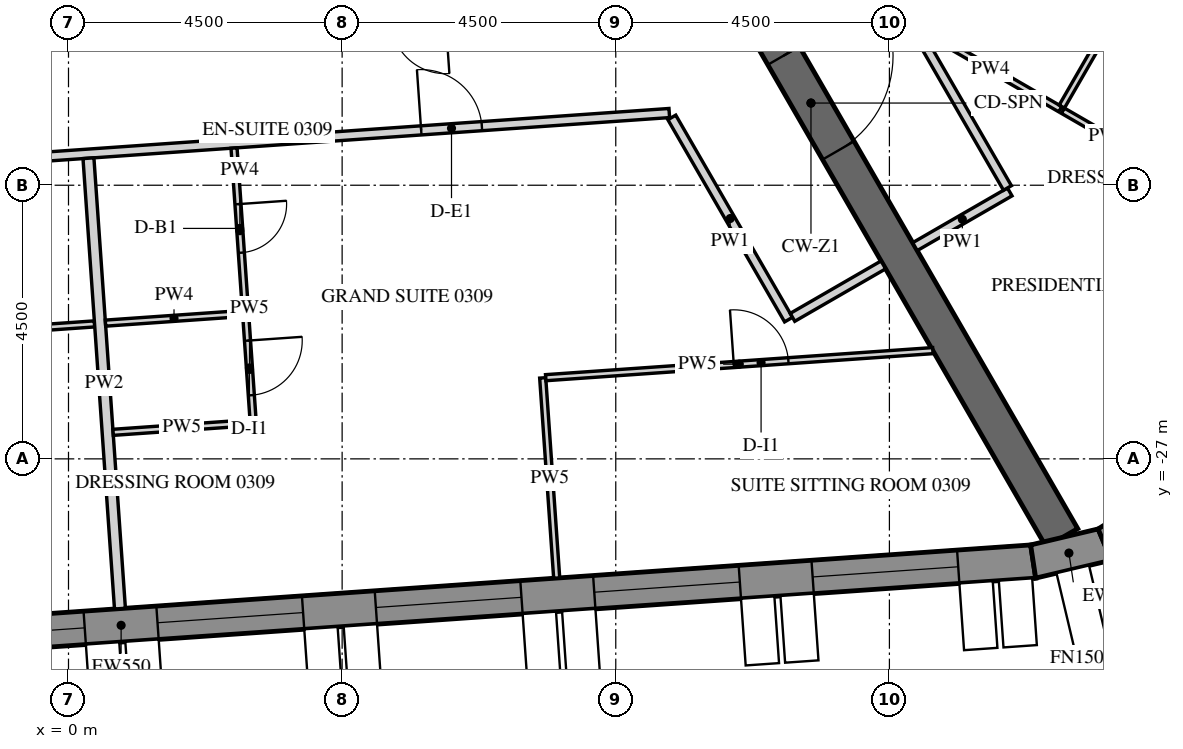
"""IFC4 building model, lengths in metres.
Left out: names, types, materials, properties, quantities, classifications, styles, units other than length and angle.
Written with IfcOpenShell. Run it as: python <this file> out.ifc"""

import sys

from ifc_helpers import new_model, si_unit, direction, frame, frame_2d, origin, place, context, subcontext, project, spatial, polyline, rectangle, outline, extrude, element, fill, save


model = new_model("IFC4")
c1 = context("Model", 3, precision=1e-05, world=origin(), true_north=direction((0.0, 1.0)))
c2 = subcontext(c1, "Body", "Model", "MODEL_VIEW")
j1 = project(units=[si_unit("LENGTHUNIT", "METRE"), si_unit("PLANEANGLEUNIT", "RADIAN")], contexts=[c1])
p1 = place(None, origin())
s1 = spatial("IfcSite", under=j1, at=p1, CompositionType="ELEMENT")
p2 = place(p1, origin())
s2 = spatial("IfcBuilding", under=s1, at=p2, CompositionType="ELEMENT")
p3 = place(p2, frame((0.0, 0.0, 60.9)))
s3 = spatial("IfcBuildingStorey", under=s2, at=p3, CompositionType="ELEMENT", Elevation=60.9)
p4 = place(p3, frame((-14.134, -30.786, -0.15), z_axis=(0.0, 0.0, 1.0), x_axis=(0.997564037441, 0.069756657061, 0.0)))
e1 = element("IfcWall", 1, at=p4, inside=s3, PredefinedType="SOLIDWALL", context=c2, shape_type="SweptSolid", body=[
    extrude(outline(polyline([(-0.026, -0.275), (30.094, -0.275), (30.049, 0.275), (0.026, 0.275), (-0.026, -0.275)])), origin(), (0.0, 0.0, 1.0), 3.9),
])
p5 = place(p4, frame((1.236, 0.0, 1.05)))
e2 = element("IfcOpeningElement", 2, at=p5, cuts=e1, PredefinedType="OPENING", context=c2, shape_type="SweptSolid", body=[
    extrude(rectangle(XDim=2.4, YDim=2.4, at=frame_2d((1.2, 1.2))), frame((0.0, 0.285, 0.0), z_axis=(0.0, -1.0, 0.0), x_axis=(1.0, 0.0, 0.0)), (0.0, 0.0, 1.0), 0.57),
])
p6 = place(p4, frame((4.835, 0.0, 1.05)))
e3 = element("IfcOpeningElement", 3, at=p6, cuts=e1, PredefinedType="OPENING", context=c2, shape_type="SweptSolid", body=[
    extrude(rectangle(XDim=2.4, YDim=2.4, at=frame_2d((1.2, 1.2))), frame((0.0, 0.285, 0.0), z_axis=(0.0, -1.0, 0.0), x_axis=(1.0, 0.0, 0.0)), (0.0, 0.0, 1.0), 0.57),
])
p7 = place(p4, frame((8.436, 0.0, 1.05)))
e4 = element("IfcOpeningElement", 4, at=p7, cuts=e1, PredefinedType="OPENING", context=c2, shape_type="SweptSolid", body=[
    extrude(rectangle(XDim=2.4, YDim=2.4, at=frame_2d((1.2, 1.2))), frame((0.0, 0.285, 0.0), z_axis=(0.0, -1.0, 0.0), x_axis=(1.0, 0.0, 0.0)), (0.0, 0.0, 1.0), 0.57),
])
p8 = place(p4, frame((12.035, 0.0, 1.05)))
e5 = element("IfcOpeningElement", 5, at=p8, cuts=e1, PredefinedType="OPENING", context=c2, shape_type="SweptSolid", body=[
    extrude(rectangle(XDim=2.4, YDim=2.4, at=frame_2d((1.2, 1.2))), frame((0.0, 0.285, 0.0), z_axis=(0.0, -1.0, 0.0), x_axis=(1.0, 0.0, 0.0)), (0.0, 0.0, 1.0), 0.57),
])
p9 = place(p4, frame((15.635, 0.0, 1.05)))
e6 = element("IfcOpeningElement", 6, at=p9, cuts=e1, PredefinedType="OPENING", context=c2, shape_type="SweptSolid", body=[
    extrude(rectangle(XDim=2.4, YDim=2.4, at=frame_2d((1.2, 1.2))), frame((0.0, 0.285, 0.0), z_axis=(0.0, -1.0, 0.0), x_axis=(1.0, 0.0, 0.0)), (0.0, 0.0, 1.0), 0.57),
])
p10 = place(p4, frame((19.236, 0.0, 1.05)))
e7 = element("IfcOpeningElement", 7, at=p10, cuts=e1, PredefinedType="OPENING", context=c2, shape_type="SweptSolid", body=[
    extrude(rectangle(XDim=2.4, YDim=2.4, at=frame_2d((1.2, 1.2))), frame((0.0, 0.285, 0.0), z_axis=(0.0, -1.0, 0.0), x_axis=(1.0, 0.0, 0.0)), (0.0, 0.0, 1.0), 0.57),
])
p11 = place(p4, frame((22.835, 0.0, 1.05)))
e8 = element("IfcOpeningElement", 8, at=p11, cuts=e1, PredefinedType="OPENING", context=c2, shape_type="SweptSolid", body=[
    extrude(rectangle(XDim=2.4, YDim=2.4, at=frame_2d((1.2, 1.2))), frame((0.0, 0.285, 0.0), z_axis=(0.0, -1.0, 0.0), x_axis=(1.0, 0.0, 0.0)), (0.0, 0.0, 1.0), 0.57),
])
p12 = place(p4, frame((26.436, 0.0, 1.05)))
e9 = element("IfcOpeningElement", 9, at=p12, cuts=e1, PredefinedType="OPENING", context=c2, shape_type="SweptSolid", body=[
    extrude(rectangle(XDim=2.4, YDim=2.4, at=frame_2d((1.2, 1.2))), frame((0.0, 0.285, 0.0), z_axis=(0.0, -1.0, 0.0), x_axis=(1.0, 0.0, 0.0)), (0.0, 0.0, 1.0), 0.57),
])
p13 = place(p3, frame((15.864, -28.688, -0.15), z_axis=(0.0, 0.0, 1.0), x_axis=(0.973063591128, 0.230536868247, 0.0)))
e10 = element("IfcWall", 10, at=p13, inside=s3, PredefinedType="SOLIDWALL", context=c2, shape_type="SweptSolid", body=[
    extrude(outline(polyline([(-0.022, -0.275), (1.253, -0.275), (1.163, 0.275), (0.022, 0.275), (-0.022, -0.275)])), origin(), (0.0, 0.0, 1.0), 3.9),
])
p14 = place(p3, frame((17.04, -28.41, -0.15), z_axis=(0.0, 0.0, 1.0), x_axis=(0.847952888306, 0.530071598195, 0.0)))
e11 = element("IfcWall", 11, at=p14, inside=s3, PredefinedType="SOLIDWALL", context=c2, shape_type="SweptSolid", body=[
    extrude(outline(polyline([(-0.045, -0.275), (1.253, -0.275), (1.163, 0.275), (0.045, 0.275), (-0.045, -0.275)])), origin(), (0.0, 0.0, 1.0), 3.9),
])
p15 = place(p3, frame((8.083, -14.0, -0.15), z_axis=(0.0, 0.0, 1.0), x_axis=(0.499997680643, -0.866026742862, 0.0)))
e12 = element("IfcWall", 12, at=p15, inside=s3, PredefinedType="SHEAR", context=c2, shape_type="SweptSolid", body=[
    extrude(rectangle(XDim=16.509, YDim=0.6, at=frame_2d((8.254, 0.0))), origin(), (0.0, 0.0, 1.0), 3.9),
])
p16 = place(p15, frame((7.354, 0.0, 0.15)))
e13 = element("IfcOpeningElement", 13, at=p16, cuts=e12, PredefinedType="OPENING", context=c2, shape_type="SweptSolid", body=[
    extrude(rectangle(XDim=1.8, YDim=2.4, at=frame_2d((0.9, 1.2))), frame((0.0, 0.31, 0.0), z_axis=(0.0, -1.0, 0.0), x_axis=(1.0, 0.0, 0.0)), (0.0, 0.0, 1.0), 0.62),
])
p17 = place(p3, frame((-12.068, -22.847, 0.0), z_axis=(0.0, 0.0, 1.0), x_axis=(0.99756437486, 0.069751831595, 0.0)))
e14 = element("IfcWall", 14, at=p17, inside=s3, PredefinedType="PARTITIONING", context=c2, shape_type="SweptSolid", body=[
    extrude(rectangle(XDim=22.002, YDim=0.15, at=frame_2d((11.001, 0.0))), origin(), (0.0, 0.0, 1.0), 2.988),
])
p18 = place(p17, frame((4.469, 0.0, 0.0)))
e15 = element("IfcOpeningElement", 15, at=p18, cuts=e14, PredefinedType="OPENING", context=c2, shape_type="SweptSolid", body=[
    extrude(rectangle(XDim=1.0, YDim=2.1, at=frame_2d((0.5, 1.05))), frame((0.0, 0.085, 0.0), z_axis=(0.0, -1.0, 0.0), x_axis=(1.0, 0.0, 0.0)), (0.0, 0.0, 1.0), 0.17),
])
p19 = place(p17, frame((17.912, 0.0, 0.0)))
e16 = element("IfcOpeningElement", 16, at=p19, cuts=e14, PredefinedType="OPENING", context=c2, shape_type="SweptSolid", body=[
    extrude(rectangle(XDim=1.0, YDim=2.1, at=frame_2d((0.5, 1.05))), frame((0.0, 0.085, 0.0), z_axis=(0.0, -1.0, 0.0), x_axis=(1.0, 0.0, 0.0)), (0.0, 0.0, 1.0), 0.17),
])
p20 = place(p3, frame((9.922, -21.385, 0.0), z_axis=(0.0, 0.0, 1.0), x_axis=(0.500023335103, -0.866011930837, 0.0)))
e17 = element("IfcWall", 17, at=p20, inside=s3, PredefinedType="PARTITIONING", context=c2, shape_type="SweptSolid", body=[
    extrude(rectangle(XDim=3.84, YDim=0.15, at=frame_2d((1.92, 0.0))), origin(), (0.0, 0.0, 1.0), 2.988),
])
p21 = place(p3, frame((11.906, -24.673, 0.0), z_axis=(0.0, 0.0, 1.0), x_axis=(0.866013532718, 0.500020560727, 0.0)))
e18 = element("IfcWall", 18, at=p21, inside=s3, PredefinedType="PARTITIONING", context=c2, shape_type="SweptSolid", body=[
    extrude(rectangle(XDim=1.725, YDim=0.15, at=frame_2d((0.863, 0.0))), origin(), (0.0, 0.0, 1.0), 2.988),
])
p22 = place(p3, frame((13.92, -23.51, 0.0), z_axis=(0.0, 0.0, 1.0), x_axis=(0.866047807691, 0.499961193289, 0.0)))
e19 = element("IfcWall", 19, at=p22, inside=s3, PredefinedType="PARTITIONING", context=c2, shape_type="SweptSolid", body=[
    extrude(rectangle(XDim=1.8, YDim=0.15, at=frame_2d((0.9, 0.0))), origin(), (0.0, 0.0, 1.0), 2.988),
])
p23 = place(p3, frame((15.441, -22.545, 0.0), z_axis=(0.0, 0.0, 1.0), x_axis=(-0.500037089193, 0.86600398927, 0.0)))
e20 = element("IfcWall", 20, at=p23, inside=s3, PredefinedType="PARTITIONING", context=c2, shape_type="SweptSolid", body=[
    extrude(rectangle(XDim=3.112, YDim=0.15, at=frame_2d((1.556, 0.0))), origin(), (0.0, 0.0, 1.0), 2.988),
])
p24 = place(p3, frame((0.428, -24.781, 0.0), z_axis=(0.0, 0.0, 1.0), x_axis=(-0.997563824095, -0.069759707979, 0.0)))
e21 = element("IfcWall", 21, at=p24, inside=s3, PredefinedType="PARTITIONING", context=c2, shape_type="SweptSolid", body=[
    extrude(rectangle(XDim=2.31, YDim=0.1, at=frame_2d((1.155, 0.0))), origin(), (0.0, 0.0, 1.0), 2.988),
])
p25 = place(p3, frame((0.846, -29.463, 0.0), z_axis=(0.0, 0.0, 1.0), x_axis=(-0.069774810252, 0.997562767877, 0.0)))
e22 = element("IfcWall", 22, at=p25, inside=s3, PredefinedType="PARTITIONING", context=c2, shape_type="SweptSolid", body=[
    extrude(rectangle(XDim=7.425, YDim=0.18, at=frame_2d((3.712, 0.0))), origin(), (0.0, 0.0, 1.0), 2.988),
])
p26 = place(p3, frame((2.722, -21.888, 0.0), z_axis=(0.0, 0.0, 1.0), x_axis=(0.069706086879, -0.997567572374, 0.0)))
e23 = element("IfcWall", 23, at=p26, inside=s3, PredefinedType="PARTITIONING", context=c2, shape_type="SweptSolid", body=[
    extrude(rectangle(XDim=2.725, YDim=0.1, at=frame_2d((1.362, 0.0))), origin(), (0.0, 0.0, 1.0), 2.988),
])
p27 = place(p26, frame((0.925, 0.0, 0.0)))
e24 = element("IfcOpeningElement", 24, at=p27, cuts=e23, PredefinedType="OPENING", context=c2, shape_type="SweptSolid", body=[
    extrude(rectangle(XDim=0.8, YDim=2.1, at=frame_2d((0.4, 1.05))), frame((0.0, 0.06, 0.0), z_axis=(0.0, -1.0, 0.0), x_axis=(1.0, 0.0, 0.0)), (0.0, 0.0, 1.0), 0.12),
])
p28 = place(p3, frame((2.916, -24.657, 0.0), z_axis=(0.0, 0.0, 1.0), x_axis=(0.069759707979, -0.997563824095, 0.0)))
e25 = element("IfcWall", 25, at=p28, inside=s3, PredefinedType="PARTITIONING", context=c2, shape_type="SweptSolid", body=[
    extrude(rectangle(XDim=1.75, YDim=0.1, at=frame_2d((0.875, 0.0))), origin(), (0.0, 0.0, 1.0), 2.988),
])
p29 = place(p28, frame((0.4, 0.0, 0.0)))
e26 = element("IfcOpeningElement", 26, at=p29, cuts=e25, PredefinedType="OPENING", context=c2, shape_type="SweptSolid", body=[
    extrude(rectangle(XDim=0.9, YDim=2.1, at=frame_2d((0.45, 1.05))), frame((0.0, 0.06, 0.0), z_axis=(0.0, -1.0, 0.0), x_axis=(1.0, 0.0, 0.0)), (0.0, 0.0, 1.0), 0.12),
])
p30 = place(p3, frame((2.988, -26.406, 0.0), z_axis=(0.0, 0.0, 1.0), x_axis=(-0.997561825928, -0.069788275888, 0.0)))
e27 = element("IfcWall", 27, at=p30, inside=s3, PredefinedType="PARTITIONING", context=c2, shape_type="SweptSolid", body=[
    extrude(rectangle(XDim=2.26, YDim=0.1, at=frame_2d((1.13, 0.0))), origin(), (0.0, 0.0, 1.0), 2.988),
])
p31 = place(p3, frame((8.029, -28.96, 0.0), z_axis=(0.0, 0.0, 1.0), x_axis=(-0.069764341483, 0.997563500063, 0.0)))
e28 = element("IfcWall", 28, at=p31, inside=s3, PredefinedType="PARTITIONING", context=c2, shape_type="SweptSolid", body=[
    extrude(rectangle(XDim=3.3, YDim=0.1, at=frame_2d((1.65, 0.0))), origin(), (0.0, 0.0, 1.0), 2.988),
])
p32 = place(p3, frame((7.848, -25.665, 0.0), z_axis=(0.0, 0.0, 1.0), x_axis=(0.997564959643, 0.069743467744, 0.0)))
e29 = element("IfcWall", 29, at=p32, inside=s3, PredefinedType="PARTITIONING", context=c2, shape_type="SweptSolid", body=[
    extrude(rectangle(XDim=6.382, YDim=0.1, at=frame_2d((3.191, 0.0))), origin(), (0.0, 0.0, 1.0), 2.988),
])
p33 = place(p32, frame((3.1, 0.0, 0.0)))
e30 = element("IfcOpeningElement", 30, at=p33, cuts=e29, PredefinedType="OPENING", context=c2, shape_type="SweptSolid", body=[
    extrude(rectangle(XDim=0.9, YDim=2.1, at=frame_2d((0.45, 1.05))), frame((0.0, 0.06, 0.0), z_axis=(0.0, -1.0, 0.0), x_axis=(1.0, 0.0, 0.0)), (0.0, 0.0, 1.0), 0.12),
])
p34 = place(p3, frame((0.608, -24.768, 0.0), z_axis=(0.0, 0.0, 1.0), x_axis=(0.997569341134, 0.069680769442, 0.0)))
e31 = element("IfcWall", 31, at=p34, inside=s3, PredefinedType="PARTITIONING", context=c2, shape_type="SweptSolid", body=[
    extrude(rectangle(XDim=2.26, YDim=0.1, at=frame_2d((1.13, 0.0))), origin(), (0.0, 0.0, 1.0), 2.988),
])
p35 = place(p3, frame((16.31, -21.25, 0.0), z_axis=(0.0, 0.0, 1.0), x_axis=(-0.866029095148, 0.499993606316, 0.0)))
e32 = element("IfcWall", 32, at=p35, inside=s3, PredefinedType="PARTITIONING", context=c2, shape_type="SweptSolid", body=[
    extrude(rectangle(XDim=2.65, YDim=0.1, at=frame_2d((1.325, 0.0))), origin(), (0.0, 0.0, 1.0), 2.988),
])
p36 = place(p3, frame((17.826, -22.125, 0.0), z_axis=(0.0, 0.0, 1.0), x_axis=(-0.865989465428, 0.500062241894, 0.0)))
e33 = element("IfcWall", 33, at=p36, inside=s3, PredefinedType="PARTITIONING", context=c2, shape_type="SweptSolid", body=[
    extrude(rectangle(XDim=1.7, YDim=0.1, at=frame_2d((0.85, 0.0))), origin(), (0.0, 0.0, 1.0), 2.988),
])
p37 = place(p3, frame((16.335, -21.207, 0.0), z_axis=(0.0, 0.0, 1.0), x_axis=(0.500004234368, 0.866022959057, 0.0)))
e34 = element("IfcWall", 34, at=p37, inside=s3, PredefinedType="PARTITIONING", context=c2, shape_type="SweptSolid", body=[
    extrude(rectangle(XDim=2.5, YDim=0.1, at=frame_2d((1.25, 0.0))), origin(), (0.0, 0.0, 1.0), 2.988),
])
p38 = place(p8, frame((0.0, 0.205, 0.0)))
e35 = element("IfcWindow", 35, at=p38, inside=s3, PartitioningType="DOUBLE_PANEL_VERTICAL", PredefinedType="WINDOW", context=c2, shape_type="SweptSolid", body=[
    extrude(rectangle(XDim=2.4, YDim=2.4, at=frame_2d((1.2, 1.2))), frame((0.0, 0.03, 0.0), z_axis=(0.0, -1.0, 0.0), x_axis=(1.0, 0.0, 0.0)), (0.0, 0.0, 1.0), 0.06),
])
fill(e5, e35)
p39 = place(p9, frame((0.0, 0.205, 0.0)))
e36 = element("IfcWindow", 36, at=p39, inside=s3, PartitioningType="DOUBLE_PANEL_VERTICAL", PredefinedType="WINDOW", context=c2, shape_type="SweptSolid", body=[
    extrude(rectangle(XDim=2.4, YDim=2.4, at=frame_2d((1.2, 1.2))), frame((0.0, 0.03, 0.0), z_axis=(0.0, -1.0, 0.0), x_axis=(1.0, 0.0, 0.0)), (0.0, 0.0, 1.0), 0.06),
])
fill(e6, e36)
p40 = place(p10, frame((0.0, 0.205, 0.0)))
e37 = element("IfcWindow", 37, at=p40, inside=s3, PartitioningType="DOUBLE_PANEL_VERTICAL", PredefinedType="WINDOW", context=c2, shape_type="SweptSolid", body=[
    extrude(rectangle(XDim=2.4, YDim=2.4, at=frame_2d((1.2, 1.2))), frame((0.0, 0.03, 0.0), z_axis=(0.0, -1.0, 0.0), x_axis=(1.0, 0.0, 0.0)), (0.0, 0.0, 1.0), 0.06),
])
fill(e7, e37)
p41 = place(p11, frame((0.0, 0.205, 0.0)))
e38 = element("IfcWindow", 38, at=p41, inside=s3, PartitioningType="DOUBLE_PANEL_VERTICAL", PredefinedType="WINDOW", context=c2, shape_type="SweptSolid", body=[
    extrude(rectangle(XDim=2.4, YDim=2.4, at=frame_2d((1.2, 1.2))), frame((0.0, 0.03, 0.0), z_axis=(0.0, -1.0, 0.0), x_axis=(1.0, 0.0, 0.0)), (0.0, 0.0, 1.0), 0.06),
])
fill(e8, e38)
p42 = place(p12, frame((0.0, 0.205, 0.0)))
e39 = element("IfcWindow", 39, at=p42, inside=s3, PartitioningType="DOUBLE_PANEL_VERTICAL", PredefinedType="WINDOW", context=c2, shape_type="SweptSolid", body=[
    extrude(rectangle(XDim=2.4, YDim=2.4, at=frame_2d((1.2, 1.2))), frame((0.0, 0.03, 0.0), z_axis=(0.0, -1.0, 0.0), x_axis=(1.0, 0.0, 0.0)), (0.0, 0.0, 1.0), 0.06),
])
fill(e9, e39)
p43 = place(p16, origin())
e40 = element("IfcDoor", 40, at=p43, inside=s3, OperationType="DOUBLE_DOOR_SINGLE_SWING", PredefinedType="DOOR", context=c2, shape_type="SweptSolid", body=[
    extrude(rectangle(XDim=1.8, YDim=2.4, at=frame_2d((0.9, 1.2))), frame((0.0, 0.025, 0.0), z_axis=(0.0, -1.0, 0.0), x_axis=(1.0, 0.0, 0.0)), (0.0, 0.0, 1.0), 0.05),
])
fill(e13, e40)
p44 = place(p19, origin())
e41 = element("IfcDoor", 41, at=p44, inside=s3, OperationType="SINGLE_SWING_LEFT", PredefinedType="DOOR", context=c2, shape_type="SweptSolid", body=[
    extrude(rectangle(XDim=1.0, YDim=2.1, at=frame_2d((0.5, 1.05))), frame((0.0, 0.025, 0.0), z_axis=(0.0, -1.0, 0.0), x_axis=(1.0, 0.0, 0.0)), (0.0, 0.0, 1.0), 0.05),
])
fill(e16, e41)
p45 = place(p27, origin())
e42 = element("IfcDoor", 42, at=p45, inside=s3, OperationType="SINGLE_SWING_RIGHT", PredefinedType="DOOR", context=c2, shape_type="SweptSolid", body=[
    extrude(rectangle(XDim=0.8, YDim=2.1, at=frame_2d((0.4, 1.05))), frame((0.0, 0.025, 0.0), z_axis=(0.0, -1.0, 0.0), x_axis=(1.0, 0.0, 0.0)), (0.0, 0.0, 1.0), 0.05),
])
fill(e24, e42)
p46 = place(p29, origin())
e43 = element("IfcDoor", 43, at=p46, inside=s3, OperationType="SINGLE_SWING_RIGHT", PredefinedType="DOOR", context=c2, shape_type="SweptSolid", body=[
    extrude(rectangle(XDim=0.9, YDim=2.1, at=frame_2d((0.45, 1.05))), frame((0.0, 0.025, 0.0), z_axis=(0.0, -1.0, 0.0), x_axis=(1.0, 0.0, 0.0)), (0.0, 0.0, 1.0), 0.05),
])
fill(e26, e43)
p47 = place(p33, origin())
e44 = element("IfcDoor", 44, at=p47, inside=s3, OperationType="SINGLE_SWING_LEFT", PredefinedType="DOOR", context=c2, shape_type="SweptSolid", body=[
    extrude(rectangle(XDim=0.9, YDim=2.1, at=frame_2d((0.45, 1.05))), frame((0.0, 0.025, 0.0), z_axis=(0.0, -1.0, 0.0), x_axis=(1.0, 0.0, 0.0)), (0.0, 0.0, 1.0), 0.05),
])
fill(e30, e44)
save(model, sys.argv[1])
